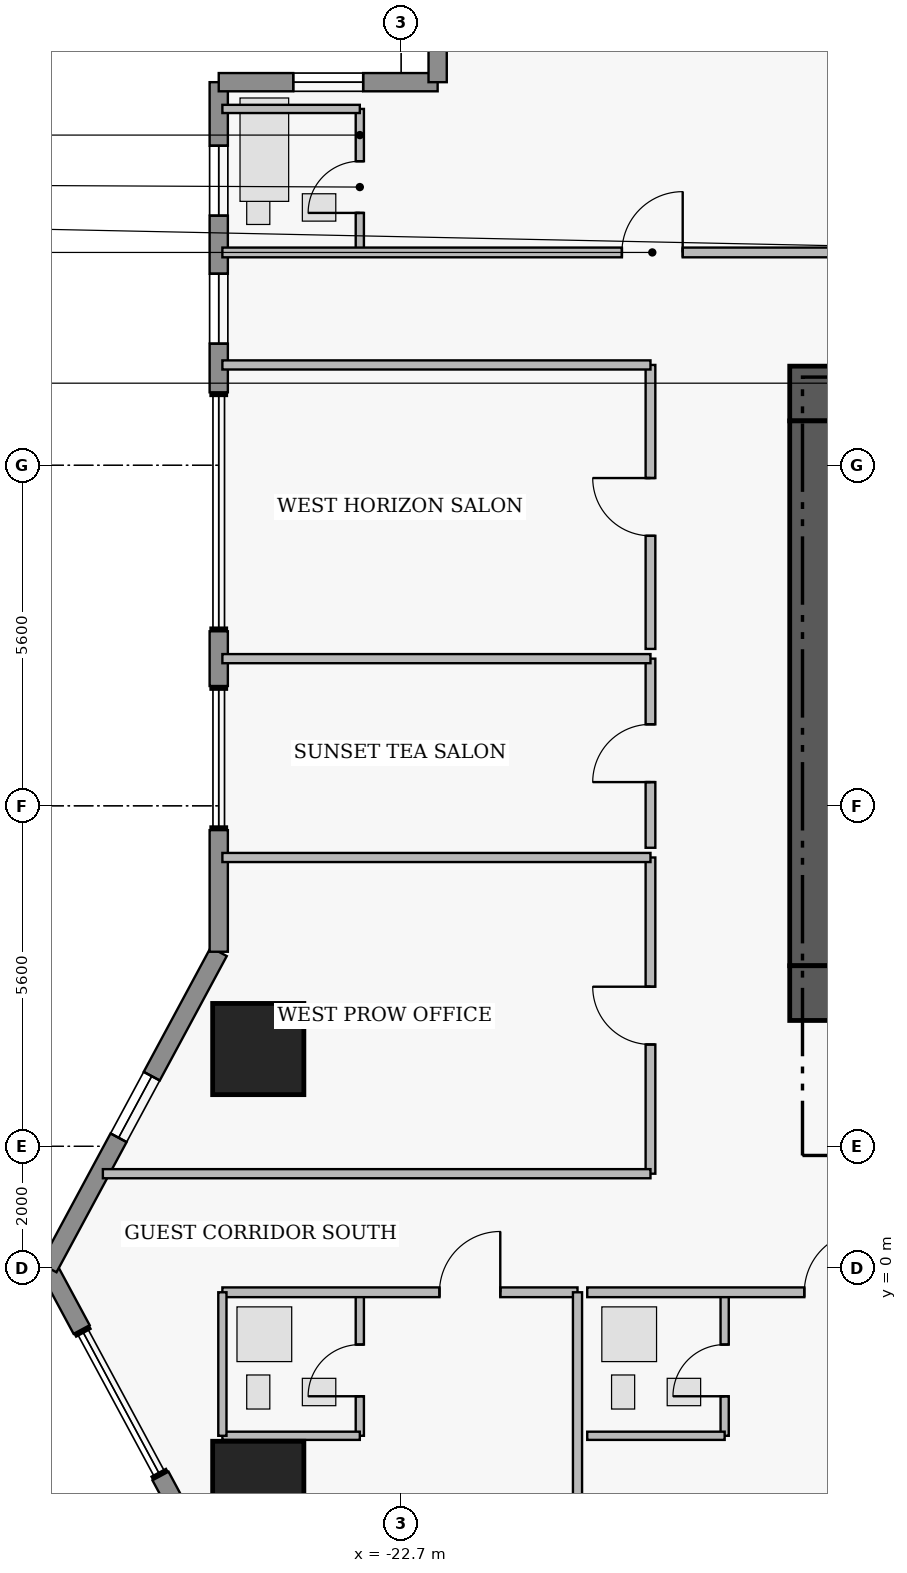
"""IFC4 building model, lengths in metres.
Left out: names, types, materials, properties, quantities, classifications, styles, units other than length and angle.
Written with IfcOpenShell. Run it as: python <this file> out.ifc"""

import sys

from ifc_helpers import new_model, si_unit, direction, frame, frame_2d, origin, origin_2d, place, context, subcontext, project, spatial, rectangle, extrude, element, fill, save


model = new_model("IFC4")
c1 = context("Model", 3, precision=1e-05, world=origin(), true_north=direction((0.0, 1.0)))
c2 = subcontext(c1, "Body", "Model", "MODEL_VIEW")
j1 = project(units=[si_unit("LENGTHUNIT", "METRE"), si_unit("PLANEANGLEUNIT", "RADIAN")], contexts=[c1])
p1 = place(None, origin())
s1 = spatial("IfcSite", under=j1, at=p1, CompositionType="ELEMENT")
p2 = place(p1, origin())
s2 = spatial("IfcBuilding", under=s1, at=p2, CompositionType="ELEMENT")
p3 = place(p2, frame((0.0, 0.0, 60.45)))
s3 = spatial("IfcBuildingStorey", under=s2, at=p3, CompositionType="ELEMENT", Elevation=60.45)
p4 = place(p3, frame((-16.31, 14.38, 0.0), z_axis=(0.0, 0.0, 1.0), x_axis=(1.0, 0.0, 0.0)))
e1 = element("IfcWall", 1, at=p4, inside=s3, PredefinedType="SHEAR", context=c2, shape_type="SweptSolid", body=[
    extrude(rectangle(XDim=4.71, YDim=0.9, at=frame_2d((2.355, 0.0))), origin(), (0.0, 0.0, 1.0), 3.46),
])
p5 = place(p3, frame((-15.86, 4.97, 0.0), z_axis=(0.0, 0.0, 1.0), x_axis=(0.0, 1.0, 0.0)))
e2 = element("IfcWall", 2, at=p5, inside=s3, PredefinedType="SHEAR", context=c2, shape_type="SweptSolid", body=[
    extrude(rectangle(XDim=8.96, YDim=0.9, at=frame_2d((4.48, 0.0))), origin(), (0.0, 0.0, 1.0), 3.46),
])
p6 = place(p3, frame((-16.31, 4.52, 0.0), z_axis=(0.0, 0.0, 1.0), x_axis=(1.0, 0.0, 0.0)))
e3 = element("IfcWall", 3, at=p6, inside=s3, PredefinedType="SHEAR", context=c2, shape_type="SweptSolid", body=[
    extrude(rectangle(XDim=4.71, YDim=0.9, at=frame_2d((2.355, 0.0))), origin(), (0.0, 0.0, 1.0), 3.46),
])
for number, where, z_axis, x_axis in (
    (4, (-25.05, -3.6, 0.0), (0.0, 0.0, 1.0), (1.0, 0.0, 0.0)),
    (5, (-25.05, 3.6, 0.0), (0.0, 0.0, 1.0), (1.0, 0.0, 0.0)),
):
    element("IfcColumn", number, at=place(p3, frame(where, z_axis=z_axis, x_axis=x_axis)), inside=s3, PredefinedType="COLUMN", context=c2, shape_type="SweptSolid", body=[
        extrude(rectangle(XDim=1.5, YDim=1.5, at=origin_2d()), origin(), (0.0, 0.0, 1.0), 3.65),
    ])
p7 = place(p3, frame((-25.7, -5.2, 0.0), z_axis=(0.0, 0.0, 1.0), x_axis=(-0.474121438562, 0.88045946045, 0.0)))
e6 = element("IfcWall", 6, at=p7, inside=s3, PredefinedType="STANDARD", context=c2, shape_type="SweptSolid", body=[
    extrude(rectangle(XDim=2.021, YDim=0.3, at=frame_2d((1.01, 0.0))), origin(), (0.0, 0.0, 1.0), 3.43),
])
p8 = place(p3, frame((-27.955, -1.012, 0.0), z_axis=(0.0, 0.0, 1.0), x_axis=(-0.474099823035, 0.880471099922, 0.0)))
e7 = element("IfcWall", 7, at=p8, inside=s3, PredefinedType="STANDARD", context=c2, shape_type="SweptSolid", body=[
    extrude(rectangle(XDim=1.15, YDim=0.3, at=frame_2d((0.575, 0.0))), origin(), (0.0, 0.0, 1.0), 3.43),
])
p9 = place(p3, frame((-28.5, 0.0, 0.0), z_axis=(0.0, 0.0, 1.0), x_axis=(0.474109683532, 0.880465790352, 0.0)))
e8 = element("IfcWall", 8, at=p9, inside=s3, PredefinedType="STANDARD", context=c2, shape_type="SweptSolid", body=[
    extrude(rectangle(XDim=5.906, YDim=0.3, at=frame_2d((2.953, 0.0))), origin(), (0.0, 0.0, 1.0), 3.43),
])
p10 = place(p9, frame((2.432, 0.0, 0.95)))
e9 = element("IfcOpeningElement", 9, at=p10, cuts=e8, PredefinedType="OPENING", context=c2, shape_type="SweptSolid", body=[
    extrude(rectangle(XDim=1.15, YDim=1.55, at=frame_2d((0.575, 0.775))), frame((0.0, 0.16, 0.0), z_axis=(0.0, -1.0, 0.0), x_axis=(1.0, 0.0, 0.0)), (0.0, 0.0, 1.0), 0.32),
])
p11 = place(p3, frame((-25.7, 5.2, 0.0), z_axis=(0.0, 0.0, 1.0), x_axis=(0.0, 1.0, 0.0)))
e10 = element("IfcWall", 10, at=p11, inside=s3, PredefinedType="STANDARD", context=c2, shape_type="SweptSolid", body=[
    extrude(rectangle(XDim=2.0, YDim=0.3, at=frame_2d((1.0, 0.0))), origin(), (0.0, 0.0, 1.0), 3.43),
])
p12 = place(p3, frame((-25.7, 9.57, 0.0), z_axis=(0.0, 0.0, 1.0), x_axis=(0.0, 1.0, 0.0)))
e11 = element("IfcWall", 11, at=p12, inside=s3, PredefinedType="STANDARD", context=c2, shape_type="SweptSolid", body=[
    extrude(rectangle(XDim=0.9, YDim=0.3, at=frame_2d((0.45, 0.0))), origin(), (0.0, 0.0, 1.0), 3.43),
])
p13 = place(p3, frame((-25.7, 14.4, 0.0), z_axis=(0.0, 0.0, 1.0), x_axis=(0.0, 1.0, 0.0)))
e12 = element("IfcWall", 12, at=p13, inside=s3, PredefinedType="STANDARD", context=c2, shape_type="SweptSolid", body=[
    extrude(rectangle(XDim=5.1, YDim=0.3, at=frame_2d((2.55, 0.0))), origin(), (0.0, 0.0, 1.0), 3.43),
])
p14 = place(p13, frame((0.8, 0.0, 0.95)))
e13 = element("IfcOpeningElement", 13, at=p14, cuts=e12, PredefinedType="OPENING", context=c2, shape_type="SweptSolid", body=[
    extrude(rectangle(XDim=1.15, YDim=1.55, at=frame_2d((0.575, 0.775))), frame((0.0, 0.16, 0.0), z_axis=(0.0, -1.0, 0.0), x_axis=(1.0, 0.0, 0.0)), (0.0, 0.0, 1.0), 0.32),
])
p15 = place(p13, frame((2.905, 0.0, 0.95)))
e14 = element("IfcOpeningElement", 14, at=p15, cuts=e12, PredefinedType="OPENING", context=c2, shape_type="SweptSolid", body=[
    extrude(rectangle(XDim=1.15, YDim=1.55, at=frame_2d((0.575, 0.775))), frame((0.0, 0.16, 0.0), z_axis=(0.0, -1.0, 0.0), x_axis=(1.0, 0.0, 0.0)), (0.0, 0.0, 1.0), 0.32),
])
p16 = place(p3, frame((-25.7, 19.5, 0.0), z_axis=(0.0, 0.0, 1.0), x_axis=(1.0, 0.0, 0.0)))
e15 = element("IfcWall", 15, at=p16, inside=s3, PredefinedType="STANDARD", context=c2, shape_type="SweptSolid", body=[
    extrude(rectangle(XDim=3.6, YDim=0.3, at=frame_2d((1.8, 0.0))), origin(), (0.0, 0.0, 1.0), 3.43),
])
p17 = place(p16, frame((1.225, 0.0, 1.25)))
e16 = element("IfcOpeningElement", 16, at=p17, cuts=e15, PredefinedType="OPENING", context=c2, shape_type="SweptSolid", body=[
    extrude(rectangle(XDim=1.15, YDim=1.55, at=frame_2d((0.575, 0.775))), frame((0.0, 0.16, 0.0), z_axis=(0.0, -1.0, 0.0), x_axis=(1.0, 0.0, 0.0)), (0.0, 0.0, 1.0), 0.32),
])
p18 = place(p3, frame((-22.1, 19.5, 0.0), z_axis=(0.0, 0.0, 1.0), x_axis=(0.0, 1.0, 0.0)))
e17 = element("IfcWall", 17, at=p18, inside=s3, PredefinedType="STANDARD", context=c2, shape_type="SweptSolid", body=[
    extrude(rectangle(XDim=3.6, YDim=0.3, at=frame_2d((1.8, 0.0))), origin(), (0.0, 0.0, 1.0), 3.43),
])
p19 = place(p18, frame((2.33, 0.0, 0.0)))
e18 = element("IfcOpeningElement", 18, at=p19, cuts=e17, PredefinedType="OPENING", context=c2, shape_type="SweptSolid", body=[
    extrude(rectangle(XDim=1.05, YDim=2.2, at=frame_2d((0.525, 1.1))), frame((0.0, 0.16, 0.0), z_axis=(0.0, -1.0, 0.0), x_axis=(1.0, 0.0, 0.0)), (0.0, 0.0, 1.0), 0.32),
])
p20 = place(p3, frame((-23.38, 16.7, 0.0), z_axis=(0.0, 0.0, 1.0), x_axis=(0.0, 1.0, 0.0)))
e19 = element("IfcWall", 19, at=p20, inside=s3, PredefinedType="PLUMBINGWALL", context=c2, shape_type="SweptSolid", body=[
    extrude(rectangle(XDim=2.36, YDim=0.135, at=frame_2d((1.18, 0.0))), origin(), (0.0, 0.0, 1.0), 3.43),
])
p21 = place(p20, frame((0.65, 0.0, 0.0)))
e20 = element("IfcOpeningElement", 20, at=p21, cuts=e19, PredefinedType="OPENING", context=c2, shape_type="SweptSolid", body=[
    extrude(rectangle(XDim=0.85, YDim=2.1, at=frame_2d((0.425, 1.05))), frame((0.0, 0.077, 0.0), z_axis=(0.0, -1.0, 0.0), x_axis=(1.0, 0.0, 0.0)), (0.0, 0.0, 1.0), 0.155),
])
p22 = place(p3, frame((-25.64, 16.7, 0.0), z_axis=(0.0, 0.0, 1.0), x_axis=(1.0, 0.0, 0.0)))
e21 = element("IfcWall", 21, at=p22, inside=s3, PredefinedType="PARTITIONING", context=c2, shape_type="SweptSolid", body=[
    extrude(rectangle(XDim=11.84, YDim=0.16, at=frame_2d((5.92, 0.0))), origin(), (0.0, 0.0, 1.0), 3.43),
])
p23 = place(p22, frame((6.57, 0.0, 0.0)))
e22 = element("IfcOpeningElement", 22, at=p23, cuts=e21, PredefinedType="OPENING", context=c2, shape_type="SweptSolid", body=[
    extrude(rectangle(XDim=1.0, YDim=2.15, at=frame_2d((0.5, 1.075))), frame((0.0, 0.09, 0.0), z_axis=(0.0, -1.0, 0.0), x_axis=(1.0, 0.0, 0.0)), (0.0, 0.0, 1.0), 0.18),
])
p24 = place(p3, frame((-23.38, -2.76, 0.0), z_axis=(0.0, 0.0, 1.0), x_axis=(0.0, 1.0, 0.0)))
e23 = element("IfcWall", 23, at=p24, inside=s3, PredefinedType="PLUMBINGWALL", context=c2, shape_type="SweptSolid", body=[
    extrude(rectangle(XDim=2.36, YDim=0.135, at=frame_2d((1.18, 0.0))), origin(), (0.0, 0.0, 1.0), 3.43),
])
p25 = place(p24, frame((0.65, 0.0, 0.0)))
e24 = element("IfcOpeningElement", 24, at=p25, cuts=e23, PredefinedType="OPENING", context=c2, shape_type="SweptSolid", body=[
    extrude(rectangle(XDim=0.85, YDim=2.1, at=frame_2d((0.425, 1.05))), frame((0.0, 0.077, 0.0), z_axis=(0.0, -1.0, 0.0), x_axis=(1.0, 0.0, 0.0)), (0.0, 0.0, 1.0), 0.155),
])
p26 = place(p3, frame((-25.64, -0.4, 0.0), z_axis=(0.0, 0.0, 1.0), x_axis=(1.0, 0.0, 0.0)))
e25 = element("IfcWall", 25, at=p26, inside=s3, PredefinedType="PARTITIONING", context=c2, shape_type="SweptSolid", body=[
    extrude(rectangle(XDim=5.84, YDim=0.16, at=frame_2d((2.92, 0.0))), origin(), (0.0, 0.0, 1.0), 3.43),
])
p27 = place(p26, frame((3.57, 0.0, 0.0)))
e26 = element("IfcOpeningElement", 26, at=p27, cuts=e25, PredefinedType="OPENING", context=c2, shape_type="SweptSolid", body=[
    extrude(rectangle(XDim=1.0, YDim=2.15, at=frame_2d((0.5, 1.075))), frame((0.0, 0.09, 0.0), z_axis=(0.0, -1.0, 0.0), x_axis=(1.0, 0.0, 0.0)), (0.0, 0.0, 1.0), 0.18),
])
p28 = place(p3, frame((-17.38, -2.76, 0.0), z_axis=(0.0, 0.0, 1.0), x_axis=(0.0, 1.0, 0.0)))
e27 = element("IfcWall", 27, at=p28, inside=s3, PredefinedType="PLUMBINGWALL", context=c2, shape_type="SweptSolid", body=[
    extrude(rectangle(XDim=2.36, YDim=0.135, at=frame_2d((1.18, 0.0))), origin(), (0.0, 0.0, 1.0), 3.43),
])
p29 = place(p28, frame((0.65, 0.0, 0.0)))
e28 = element("IfcOpeningElement", 28, at=p29, cuts=e27, PredefinedType="OPENING", context=c2, shape_type="SweptSolid", body=[
    extrude(rectangle(XDim=0.85, YDim=2.1, at=frame_2d((0.425, 1.05))), frame((0.0, 0.077, 0.0), z_axis=(0.0, -1.0, 0.0), x_axis=(1.0, 0.0, 0.0)), (0.0, 0.0, 1.0), 0.155),
])
p30 = place(p3, frame((-19.64, -0.4, 0.0), z_axis=(0.0, 0.0, 1.0), x_axis=(1.0, 0.0, 0.0)))
e29 = element("IfcWall", 29, at=p30, inside=s3, PredefinedType="PARTITIONING", context=c2, shape_type="SweptSolid", body=[
    extrude(rectangle(XDim=5.84, YDim=0.16, at=frame_2d((2.92, 0.0))), origin(), (0.0, 0.0, 1.0), 3.43),
])
p31 = place(p30, frame((3.57, 0.0, 0.0)))
e30 = element("IfcOpeningElement", 30, at=p31, cuts=e29, PredefinedType="OPENING", context=c2, shape_type="SweptSolid", body=[
    extrude(rectangle(XDim=1.0, YDim=2.15, at=frame_2d((0.5, 1.075))), frame((0.0, 0.09, 0.0), z_axis=(0.0, -1.0, 0.0), x_axis=(1.0, 0.0, 0.0)), (0.0, 0.0, 1.0), 0.18),
])
p32 = place(p3, frame((-18.6, 1.55, 0.0), z_axis=(0.0, 0.0, 1.0), x_axis=(0.0, 1.0, 0.0)))
e31 = element("IfcWall", 31, at=p32, inside=s3, PredefinedType="PARTITIONING", context=c2, shape_type="SweptSolid", body=[
    extrude(rectangle(XDim=5.2, YDim=0.16, at=frame_2d((2.6, 0.0))), origin(), (0.0, 0.0, 1.0), 3.43),
])
p33 = place(p32, frame((2.125, 0.0, 0.0)))
e32 = element("IfcOpeningElement", 32, at=p33, cuts=e31, PredefinedType="OPENING", context=c2, shape_type="SweptSolid", body=[
    extrude(rectangle(XDim=0.95, YDim=2.15, at=frame_2d((0.475, 1.075))), frame((0.0, 0.09, 0.0), z_axis=(0.0, -1.0, 0.0), x_axis=(1.0, 0.0, 0.0)), (0.0, 0.0, 1.0), 0.18),
])
p34 = place(p3, frame((-18.6, 6.91, 0.0), z_axis=(0.0, 0.0, 1.0), x_axis=(0.0, 1.0, 0.0)))
e33 = element("IfcWall", 33, at=p34, inside=s3, PredefinedType="PARTITIONING", context=c2, shape_type="SweptSolid", body=[
    extrude(rectangle(XDim=3.11, YDim=0.16, at=frame_2d((1.555, 0.0))), origin(), (0.0, 0.0, 1.0), 3.43),
])
p35 = place(p34, frame((1.08, 0.0, 0.0)))
e34 = element("IfcOpeningElement", 34, at=p35, cuts=e33, PredefinedType="OPENING", context=c2, shape_type="SweptSolid", body=[
    extrude(rectangle(XDim=0.95, YDim=2.15, at=frame_2d((0.475, 1.075))), frame((0.0, 0.09, 0.0), z_axis=(0.0, -1.0, 0.0), x_axis=(1.0, 0.0, 0.0)), (0.0, 0.0, 1.0), 0.18),
])
p36 = place(p3, frame((-18.6, 10.18, 0.0), z_axis=(0.0, 0.0, 1.0), x_axis=(0.0, 1.0, 0.0)))
e35 = element("IfcWall", 35, at=p36, inside=s3, PredefinedType="PARTITIONING", context=c2, shape_type="SweptSolid", body=[
    extrude(rectangle(XDim=4.67, YDim=0.16, at=frame_2d((2.335, 0.0))), origin(), (0.0, 0.0, 1.0), 3.43),
])
p37 = place(p36, frame((1.86, 0.0, 0.0)))
e36 = element("IfcOpeningElement", 36, at=p37, cuts=e35, PredefinedType="OPENING", context=c2, shape_type="SweptSolid", body=[
    extrude(rectangle(XDim=0.95, YDim=2.15, at=frame_2d((0.475, 1.075))), frame((0.0, 0.09, 0.0), z_axis=(0.0, -1.0, 0.0), x_axis=(1.0, 0.0, 0.0)), (0.0, 0.0, 1.0), 0.18),
])
for number, where, z_axis, x_axis in (
    (37, (-25.64, 19.06, 0.0), (0.0, 0.0, 1.0), (1.0, 0.0, 0.0)),
    (38, (-25.64, -2.76, 0.0), (0.0, 0.0, 1.0), (1.0, 0.0, 0.0)),
):
    element("IfcWall", number, at=place(p3, frame(where, z_axis=z_axis, x_axis=x_axis)), inside=s3, PredefinedType="PLUMBINGWALL", context=c2, shape_type="SweptSolid", body=[
        extrude(rectangle(XDim=2.26, YDim=0.135, at=frame_2d((1.13, 0.0))), origin(), (0.0, 0.0, 1.0), 3.43),
    ])
p38 = place(p3, frame((-25.64, -2.76, 0.0), z_axis=(0.0, 0.0, 1.0), x_axis=(0.0, 1.0, 0.0)))
e39 = element("IfcWall", 39, at=p38, inside=s3, PredefinedType="PLUMBINGWALL", context=c2, shape_type="SweptSolid", body=[
    extrude(rectangle(XDim=2.36, YDim=0.135, at=frame_2d((1.18, 0.0))), origin(), (0.0, 0.0, 1.0), 3.43),
])
p39 = place(p3, frame((-19.8, -23.02, 0.0), z_axis=(0.0, 0.0, 1.0), x_axis=(0.0, 1.0, 0.0)))
e40 = element("IfcWall", 40, at=p39, inside=s3, PredefinedType="PARTITIONING", context=c2, shape_type="SweptSolid", body=[
    extrude(rectangle(XDim=22.62, YDim=0.15, at=frame_2d((11.31, 0.0))), origin(), (0.0, 0.0, 1.0), 3.43),
])
p40 = place(p3, frame((-19.64, -2.76, 0.0), z_axis=(0.0, 0.0, 1.0), x_axis=(1.0, 0.0, 0.0)))
e41 = element("IfcWall", 41, at=p40, inside=s3, PredefinedType="PLUMBINGWALL", context=c2, shape_type="SweptSolid", body=[
    extrude(rectangle(XDim=2.26, YDim=0.135, at=frame_2d((1.13, 0.0))), origin(), (0.0, 0.0, 1.0), 3.43),
])
p41 = place(p3, frame((-27.605, 1.55, 0.0), z_axis=(0.0, 0.0, 1.0), x_axis=(1.0, 0.0, 0.0)))
e42 = element("IfcWall", 42, at=p41, inside=s3, PredefinedType="PARTITIONING", context=c2, shape_type="SweptSolid", body=[
    extrude(rectangle(XDim=9.005, YDim=0.15, at=frame_2d((4.503, 0.0))), origin(), (0.0, 0.0, 1.0), 3.43),
])
for number, where, z_axis, x_axis in (
    (43, (-25.64, 6.75, 0.0), (0.0, 0.0, 1.0), (1.0, 0.0, 0.0)),
    (44, (-25.64, 10.02, 0.0), (0.0, 0.0, 1.0), (1.0, 0.0, 0.0)),
    (45, (-25.64, 14.85, 0.0), (0.0, 0.0, 1.0), (1.0, 0.0, 0.0)),
):
    element("IfcWall", number, at=place(p3, frame(where, z_axis=z_axis, x_axis=x_axis)), inside=s3, PredefinedType="PARTITIONING", context=c2, shape_type="SweptSolid", body=[
        extrude(rectangle(XDim=7.04, YDim=0.15, at=frame_2d((3.52, 0.0))), origin(), (0.0, 0.0, 1.0), 3.43),
    ])
p42 = place(p10, origin())
e46 = element("IfcWindow", 46, at=p42, inside=s3, PartitioningType="SINGLE_PANEL", PredefinedType="WINDOW", context=c2, shape_type="SweptSolid", body=[
    extrude(rectangle(XDim=1.15, YDim=1.55, at=frame_2d((0.575, 0.775))), frame((0.0, 0.03, 0.0), z_axis=(0.0, -1.0, 0.0), x_axis=(1.0, 0.0, 0.0)), (0.0, 0.0, 1.0), 0.06),
])
fill(e9, e46)
p43 = place(p14, origin())
e47 = element("IfcWindow", 47, at=p43, inside=s3, PartitioningType="SINGLE_PANEL", PredefinedType="WINDOW", context=c2, shape_type="SweptSolid", body=[
    extrude(rectangle(XDim=1.15, YDim=1.55, at=frame_2d((0.575, 0.775))), frame((0.0, 0.03, 0.0), z_axis=(0.0, -1.0, 0.0), x_axis=(1.0, 0.0, 0.0)), (0.0, 0.0, 1.0), 0.06),
])
fill(e13, e47)
p44 = place(p15, origin())
e48 = element("IfcWindow", 48, at=p44, inside=s3, PartitioningType="SINGLE_PANEL", PredefinedType="WINDOW", context=c2, shape_type="SweptSolid", body=[
    extrude(rectangle(XDim=1.15, YDim=1.55, at=frame_2d((0.575, 0.775))), frame((0.0, 0.03, 0.0), z_axis=(0.0, -1.0, 0.0), x_axis=(1.0, 0.0, 0.0)), (0.0, 0.0, 1.0), 0.06),
])
fill(e14, e48)
p45 = place(p17, origin())
e49 = element("IfcWindow", 49, at=p45, inside=s3, PartitioningType="SINGLE_PANEL", PredefinedType="WINDOW", context=c2, shape_type="SweptSolid", body=[
    extrude(rectangle(XDim=1.15, YDim=1.55, at=frame_2d((0.575, 0.775))), frame((0.0, 0.03, 0.0), z_axis=(0.0, -1.0, 0.0), x_axis=(1.0, 0.0, 0.0)), (0.0, 0.0, 1.0), 0.06),
])
fill(e16, e49)
p46 = place(p21, origin())
e50 = element("IfcDoor", 50, at=p46, inside=s3, OperationType="SINGLE_SWING_LEFT", PredefinedType="DOOR", context=c2, shape_type="SweptSolid", body=[
    extrude(rectangle(XDim=0.85, YDim=2.1, at=frame_2d((0.425, 1.05))), frame((0.0, 0.025, 0.0), z_axis=(0.0, -1.0, 0.0), x_axis=(1.0, 0.0, 0.0)), (0.0, 0.0, 1.0), 0.05),
])
fill(e20, e50)
p47 = place(p23, origin())
e51 = element("IfcDoor", 51, at=p47, inside=s3, OperationType="SINGLE_SWING_RIGHT", PredefinedType="DOOR", context=c2, shape_type="SweptSolid", body=[
    extrude(rectangle(XDim=1.0, YDim=2.15, at=frame_2d((0.5, 1.075))), frame((0.0, 0.025, 0.0), z_axis=(0.0, -1.0, 0.0), x_axis=(1.0, 0.0, 0.0)), (0.0, 0.0, 1.0), 0.05),
])
fill(e22, e51)
p48 = place(p25, origin())
e52 = element("IfcDoor", 52, at=p48, inside=s3, OperationType="SINGLE_SWING_LEFT", PredefinedType="DOOR", context=c2, shape_type="SweptSolid", body=[
    extrude(rectangle(XDim=0.85, YDim=2.1, at=frame_2d((0.425, 1.05))), frame((0.0, 0.025, 0.0), z_axis=(0.0, -1.0, 0.0), x_axis=(1.0, 0.0, 0.0)), (0.0, 0.0, 1.0), 0.05),
])
fill(e24, e52)
p49 = place(p27, origin())
e53 = element("IfcDoor", 53, at=p49, inside=s3, OperationType="SINGLE_SWING_RIGHT", PredefinedType="DOOR", context=c2, shape_type="SweptSolid", body=[
    extrude(rectangle(XDim=1.0, YDim=2.15, at=frame_2d((0.5, 1.075))), frame((0.0, 0.025, 0.0), z_axis=(0.0, -1.0, 0.0), x_axis=(1.0, 0.0, 0.0)), (0.0, 0.0, 1.0), 0.05),
])
fill(e26, e53)
p50 = place(p29, origin())
e54 = element("IfcDoor", 54, at=p50, inside=s3, OperationType="SINGLE_SWING_LEFT", PredefinedType="DOOR", context=c2, shape_type="SweptSolid", body=[
    extrude(rectangle(XDim=0.85, YDim=2.1, at=frame_2d((0.425, 1.05))), frame((0.0, 0.025, 0.0), z_axis=(0.0, -1.0, 0.0), x_axis=(1.0, 0.0, 0.0)), (0.0, 0.0, 1.0), 0.05),
])
fill(e28, e54)
p51 = place(p31, origin())
e55 = element("IfcDoor", 55, at=p51, inside=s3, OperationType="SINGLE_SWING_RIGHT", PredefinedType="DOOR", context=c2, shape_type="SweptSolid", body=[
    extrude(rectangle(XDim=1.0, YDim=2.15, at=frame_2d((0.5, 1.075))), frame((0.0, 0.025, 0.0), z_axis=(0.0, -1.0, 0.0), x_axis=(1.0, 0.0, 0.0)), (0.0, 0.0, 1.0), 0.05),
])
fill(e30, e55)
p52 = place(p33, origin())
e56 = element("IfcDoor", 56, at=p52, inside=s3, OperationType="SINGLE_SWING_RIGHT", PredefinedType="DOOR", context=c2, shape_type="SweptSolid", body=[
    extrude(rectangle(XDim=0.95, YDim=2.15, at=frame_2d((0.475, 1.075))), frame((0.0, 0.025, 0.0), z_axis=(0.0, -1.0, 0.0), x_axis=(1.0, 0.0, 0.0)), (0.0, 0.0, 1.0), 0.05),
])
fill(e32, e56)
p53 = place(p35, origin())
e57 = element("IfcDoor", 57, at=p53, inside=s3, OperationType="SINGLE_SWING_LEFT", PredefinedType="DOOR", context=c2, shape_type="SweptSolid", body=[
    extrude(rectangle(XDim=0.95, YDim=2.15, at=frame_2d((0.475, 1.075))), frame((0.0, 0.025, 0.0), z_axis=(0.0, -1.0, 0.0), x_axis=(1.0, 0.0, 0.0)), (0.0, 0.0, 1.0), 0.05),
])
fill(e34, e57)
p54 = place(p37, origin())
e58 = element("IfcDoor", 58, at=p54, inside=s3, OperationType="SINGLE_SWING_RIGHT", PredefinedType="DOOR", context=c2, shape_type="SweptSolid", body=[
    extrude(rectangle(XDim=0.95, YDim=2.15, at=frame_2d((0.475, 1.075))), frame((0.0, 0.025, 0.0), z_axis=(0.0, -1.0, 0.0), x_axis=(1.0, 0.0, 0.0)), (0.0, 0.0, 1.0), 0.05),
])
fill(e36, e58)
save(model, sys.argv[1])
